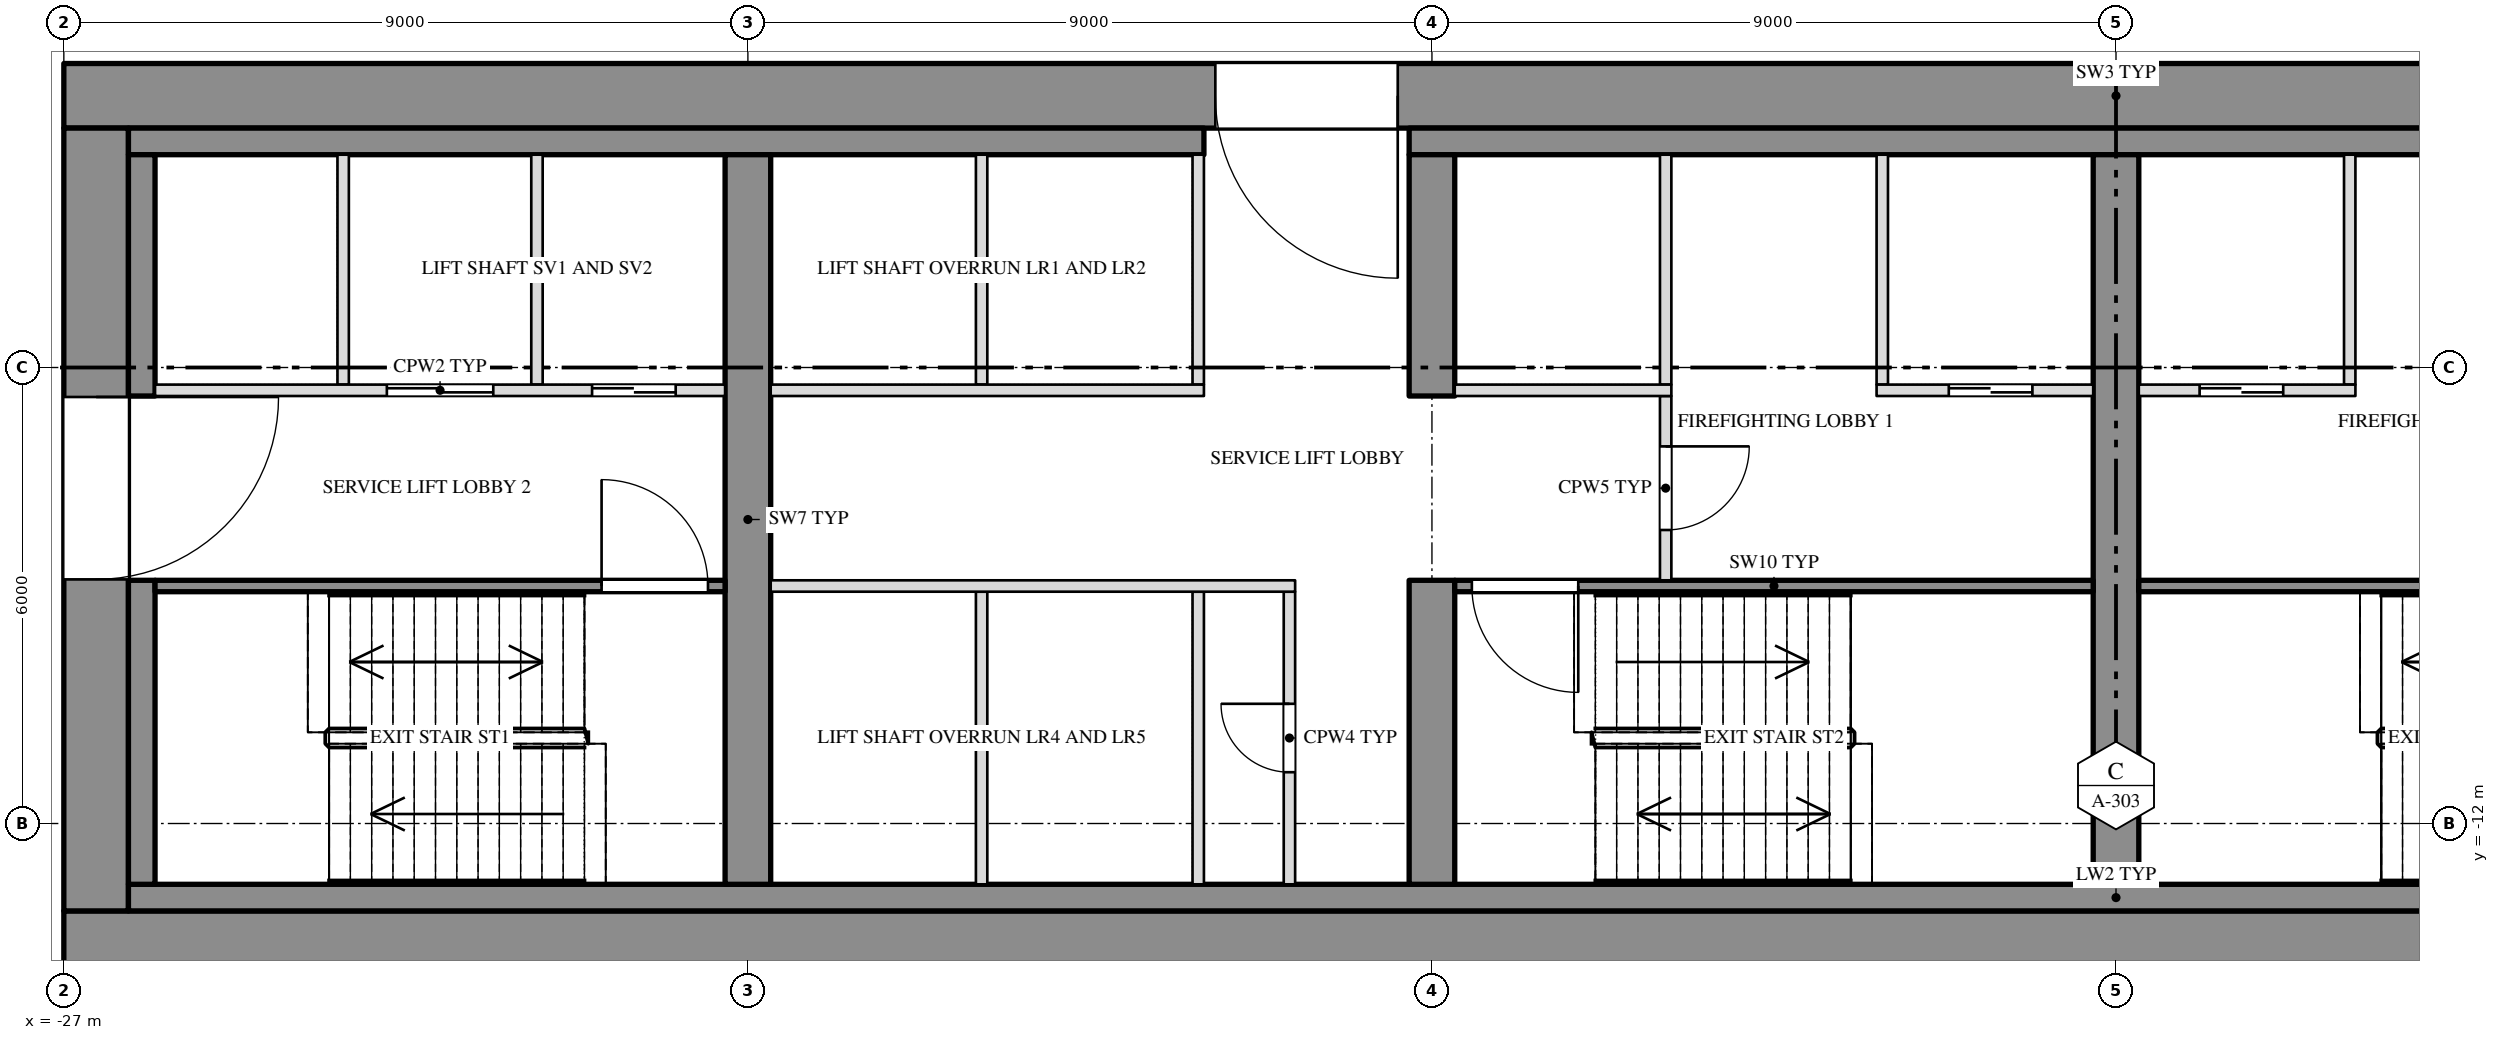
"""IFC4 building model, lengths in metres.
Left out: names, types, materials, properties, quantities, classifications, styles, units other than length and angle.
Written with IfcOpenShell. Run it as: python <this file> out.ifc"""

import sys

from ifc_helpers import new_model, si_unit, direction, frame, frame_2d, origin, place, context, subcontext, project, spatial, rectangle, extrude, element, fill, save


model = new_model("IFC4")
c1 = context("Model", 3, precision=1e-05, world=origin(), true_north=direction((0.0, 1.0)))
c2 = subcontext(c1, "Body", "Model", "MODEL_VIEW")
j1 = project(units=[si_unit("LENGTHUNIT", "METRE"), si_unit("PLANEANGLEUNIT", "RADIAN")], contexts=[c1])
p1 = place(None, origin())
s1 = spatial("IfcSite", under=j1, at=p1, CompositionType="ELEMENT")
p2 = place(p1, origin())
s2 = spatial("IfcBuilding", under=s1, at=p2, CompositionType="ELEMENT")
p3 = place(p2, frame((0.0, 0.0, 160.5)))
s3 = spatial("IfcBuildingStorey", under=s2, at=p3, CompositionType="ELEMENT", Elevation=160.5)
p4 = place(p3, frame((-27.0, -2.425, 0.0), z_axis=(0.0, 0.0, 1.0), x_axis=(1.0, 0.0, 0.0)))
e1 = element("IfcWall", 1, at=p4, inside=s3, PredefinedType="SHEAR", context=c2, shape_type="SweptSolid", body=[
    extrude(rectangle(XDim=54.0, YDim=0.85, at=frame_2d((27.0, 0.0))), origin(), (0.0, 0.0, 1.0), 3.8),
])
p5 = place(p4, frame((15.15, 0.0, 0.0)))
e2 = element("IfcOpeningElement", 2, at=p5, cuts=e1, PredefinedType="OPENING", context=c2, shape_type="SweptSolid", body=[
    extrude(rectangle(XDim=2.4, YDim=2.1, at=frame_2d((1.2, 1.05))), frame((0.0, 0.437, 0.0), z_axis=(0.0, -1.0, 0.0), x_axis=(1.0, 0.0, 0.0)), (0.0, 0.0, 1.0), 0.874),
])
p6 = place(p4, frame((36.45, 0.0, 0.0)))
e3 = element("IfcOpeningElement", 3, at=p6, cuts=e1, PredefinedType="OPENING", context=c2, shape_type="SweptSolid", body=[
    extrude(rectangle(XDim=2.4, YDim=2.1, at=frame_2d((1.2, 1.05))), frame((0.0, 0.437, 0.0), z_axis=(0.0, -1.0, 0.0), x_axis=(1.0, 0.0, 0.0)), (0.0, 0.0, 1.0), 0.874),
])
p7 = place(p3, frame((-27.0, -13.575, 0.0), z_axis=(0.0, 0.0, 1.0), x_axis=(1.0, 0.0, 0.0)))
e4 = element("IfcWall", 4, at=p7, inside=s3, PredefinedType="SHEAR", context=c2, shape_type="SweptSolid", body=[
    extrude(rectangle(XDim=54.0, YDim=0.85, at=frame_2d((27.0, 0.0))), origin(), (0.0, 0.0, 1.0), 3.8),
])
p8 = place(p3, frame((-26.575, -13.15, 0.0), z_axis=(0.0, 0.0, 1.0), x_axis=(0.0, 1.0, 0.0)))
e5 = element("IfcWall", 5, at=p8, inside=s3, PredefinedType="SHEAR", context=c2, shape_type="SweptSolid", body=[
    extrude(rectangle(XDim=10.3, YDim=0.85, at=frame_2d((5.15, 0.0))), origin(), (0.0, 0.0, 1.0), 3.8),
])
p9 = place(p8, frame((4.362, 0.0, 0.0)))
e6 = element("IfcOpeningElement", 6, at=p9, cuts=e5, PredefinedType="OPENING", context=c2, shape_type="SweptSolid", body=[
    extrude(rectangle(XDim=2.4, YDim=2.1, at=frame_2d((1.2, 1.05))), frame((0.0, 0.437, 0.0), z_axis=(0.0, -1.0, 0.0), x_axis=(1.0, 0.0, 0.0)), (0.0, 0.0, 1.0), 0.874),
])
p10 = place(p3, frame((-26.15, -3.025, 0.0), z_axis=(0.0, 0.0, 1.0), x_axis=(1.0, 0.0, 0.0)))
e7 = element("IfcWall", 7, at=p10, inside=s3, PredefinedType="SHEAR", context=c2, shape_type="SweptSolid", body=[
    extrude(rectangle(XDim=14.15, YDim=0.35, at=frame_2d((7.075, 0.0))), origin(), (0.0, 0.0, 1.0), 3.8),
])
p11 = place(p3, frame((-9.3, -3.025, 0.0), z_axis=(0.0, 0.0, 1.0), x_axis=(1.0, 0.0, 0.0)))
e8 = element("IfcWall", 8, at=p11, inside=s3, PredefinedType="SHEAR", context=c2, shape_type="SweptSolid", body=[
    extrude(rectangle(XDim=18.6, YDim=0.35, at=frame_2d((9.3, 0.0))), origin(), (0.0, 0.0, 1.0), 3.8),
])
p12 = place(p3, frame((-26.15, -12.975, 0.0), z_axis=(0.0, 0.0, 1.0), x_axis=(1.0, 0.0, 0.0)))
e9 = element("IfcWall", 9, at=p12, inside=s3, PredefinedType="SHEAR", context=c2, shape_type="SweptSolid", body=[
    extrude(rectangle(XDim=52.3, YDim=0.35, at=frame_2d((26.15, 0.0))), origin(), (0.0, 0.0, 1.0), 3.8),
])
p13 = place(p3, frame((-25.975, -12.8, 0.0), z_axis=(0.0, 0.0, 1.0), x_axis=(0.0, 1.0, 0.0)))
e10 = element("IfcWall", 10, at=p13, inside=s3, PredefinedType="SHEAR", context=c2, shape_type="SweptSolid", body=[
    extrude(rectangle(XDim=4.0, YDim=0.35, at=frame_2d((2.0, 0.0))), origin(), (0.0, 0.0, 1.0), 3.8),
])
p14 = place(p3, frame((-25.975, -6.375, 0.0), z_axis=(0.0, 0.0, 1.0), x_axis=(0.0, 1.0, 0.0)))
e11 = element("IfcWall", 11, at=p14, inside=s3, PredefinedType="SHEAR", context=c2, shape_type="SweptSolid", body=[
    extrude(rectangle(XDim=3.175, YDim=0.35, at=frame_2d((1.587, 0.0))), origin(), (0.0, 0.0, 1.0), 3.8),
])
p15 = place(p3, frame((-18.0, -12.8, 0.0), z_axis=(0.0, 0.0, 1.0), x_axis=(0.0, 1.0, 0.0)))
e12 = element("IfcWall", 12, at=p15, inside=s3, PredefinedType="SHEAR", context=c2, shape_type="SweptSolid", body=[
    extrude(rectangle(XDim=9.6, YDim=0.6, at=frame_2d((4.8, 0.0))), origin(), (0.0, 0.0, 1.0), 3.8),
])
p16 = place(p3, frame((-9.0, -12.8, 0.0), z_axis=(0.0, 0.0, 1.0), x_axis=(0.0, 1.0, 0.0)))
e13 = element("IfcWall", 13, at=p16, inside=s3, PredefinedType="SHEAR", context=c2, shape_type="SweptSolid", body=[
    extrude(rectangle(XDim=4.0, YDim=0.6, at=frame_2d((2.0, 0.0))), origin(), (0.0, 0.0, 1.0), 3.8),
])
p17 = place(p3, frame((-9.0, -6.375, 0.0), z_axis=(0.0, 0.0, 1.0), x_axis=(0.0, 1.0, 0.0)))
e14 = element("IfcWall", 14, at=p17, inside=s3, PredefinedType="SHEAR", context=c2, shape_type="SweptSolid", body=[
    extrude(rectangle(XDim=3.175, YDim=0.6, at=frame_2d((1.587, 0.0))), origin(), (0.0, 0.0, 1.0), 3.8),
])
p18 = place(p3, frame((0.0, -12.8, 0.0), z_axis=(0.0, 0.0, 1.0), x_axis=(0.0, 1.0, 0.0)))
e15 = element("IfcWall", 15, at=p18, inside=s3, PredefinedType="SHEAR", context=c2, shape_type="SweptSolid", body=[
    extrude(rectangle(XDim=9.6, YDim=0.6, at=frame_2d((4.8, 0.0))), origin(), (0.0, 0.0, 1.0), 3.8),
])
for number, where, z_axis, x_axis in (
    (16, (-20.775, -6.225, 0.0), (0.0, 0.0, 1.0), (0.0, 1.0, 0.0)),
    (17, (-23.325, -6.225, 0.0), (0.0, 0.0, 1.0), (0.0, 1.0, 0.0)),
    (18, (-12.075, -6.225, 0.0), (0.0, 0.0, 1.0), (0.0, 1.0, 0.0)),
    (19, (-14.925, -6.225, 0.0), (0.0, 0.0, 1.0), (0.0, 1.0, 0.0)),
    (20, (-3.075, -6.225, 0.0), (0.0, 0.0, 1.0), (0.0, 1.0, 0.0)),
    (21, (-5.925, -6.225, 0.0), (0.0, 0.0, 1.0), (0.0, 1.0, 0.0)),
    (22, (3.075, -6.225, 0.0), (0.0, 0.0, 1.0), (0.0, 1.0, 0.0)),
):
    element("IfcWall", number, at=place(p3, frame(where, z_axis=z_axis, x_axis=x_axis)), inside=s3, PredefinedType="PARTITIONING", context=c2, shape_type="SweptSolid", body=[
        extrude(rectangle(XDim=3.025, YDim=0.15, at=frame_2d((1.513, 0.0))), origin(), (0.0, 0.0, 1.0), 3.8),
    ])
p19 = place(p3, frame((-10.875, -12.8, 0.0), z_axis=(0.0, 0.0, 1.0), x_axis=(0.0, 1.0, 0.0)))
e23 = element("IfcWall", 23, at=p19, inside=s3, PredefinedType="PARTITIONING", context=c2, shape_type="SweptSolid", body=[
    extrude(rectangle(XDim=3.85, YDim=0.15, at=frame_2d((1.925, 0.0))), origin(), (0.0, 0.0, 1.0), 3.8),
])
p20 = place(p19, frame((1.475, 0.0, 0.0)))
e24 = element("IfcOpeningElement", 24, at=p20, cuts=e23, PredefinedType="OPENING", context=c2, shape_type="SweptSolid", body=[
    extrude(rectangle(XDim=0.9, YDim=2.1, at=frame_2d((0.45, 1.05))), frame((0.0, 0.087, 0.0), z_axis=(0.0, -1.0, 0.0), x_axis=(1.0, 0.0, 0.0)), (0.0, 0.0, 1.0), 0.174),
])
for number, where, z_axis, x_axis in (
    (25, (-12.075, -12.8, 0.0), (0.0, 0.0, 1.0), (0.0, 1.0, 0.0)),
    (26, (-14.925, -12.8, 0.0), (0.0, 0.0, 1.0), (0.0, 1.0, 0.0)),
):
    element("IfcWall", number, at=place(p3, frame(where, z_axis=z_axis, x_axis=x_axis)), inside=s3, PredefinedType="PARTITIONING", context=c2, shape_type="SweptSolid", body=[
        extrude(rectangle(XDim=3.85, YDim=0.15, at=frame_2d((1.925, 0.0))), origin(), (0.0, 0.0, 1.0), 3.8),
    ])
p21 = place(p3, frame((-5.925, -8.8, 0.0), z_axis=(0.0, 0.0, 1.0), x_axis=(0.0, 1.0, 0.0)))
e27 = element("IfcWall", 27, at=p21, inside=s3, PredefinedType="PARTITIONING", context=c2, shape_type="SweptSolid", body=[
    extrude(rectangle(XDim=2.425, YDim=0.15, at=frame_2d((1.212, 0.0))), origin(), (0.0, 0.0, 1.0), 3.8),
])
p22 = place(p21, frame((0.662, 0.0, 0.0)))
e28 = element("IfcOpeningElement", 28, at=p22, cuts=e27, PredefinedType="OPENING", context=c2, shape_type="SweptSolid", body=[
    extrude(rectangle(XDim=1.1, YDim=2.1, at=frame_2d((0.55, 1.05))), frame((0.0, 0.087, 0.0), z_axis=(0.0, -1.0, 0.0), x_axis=(1.0, 0.0, 0.0)), (0.0, 0.0, 1.0), 0.174),
])
p23 = place(p3, frame((-25.8, -6.3, 0.0), z_axis=(0.0, 0.0, 1.0), x_axis=(1.0, 0.0, 0.0)))
e29 = element("IfcWall", 29, at=p23, inside=s3, PredefinedType="PARTITIONING", context=c2, shape_type="SweptSolid", body=[
    extrude(rectangle(XDim=7.5, YDim=0.15, at=frame_2d((3.75, 0.0))), origin(), (0.0, 0.0, 1.0), 3.8),
])
p24 = place(p23, frame((3.05, 0.0, 0.0)))
e30 = element("IfcOpeningElement", 30, at=p24, cuts=e29, PredefinedType="OPENING", context=c2, shape_type="SweptSolid", body=[
    extrude(rectangle(XDim=1.4, YDim=2.1, at=frame_2d((0.7, 1.05))), frame((0.0, 0.087, 0.0), z_axis=(0.0, -1.0, 0.0), x_axis=(1.0, 0.0, 0.0)), (0.0, 0.0, 1.0), 0.174),
])
p25 = place(p23, frame((5.75, 0.0, 0.0)))
e31 = element("IfcOpeningElement", 31, at=p25, cuts=e29, PredefinedType="OPENING", context=c2, shape_type="SweptSolid", body=[
    extrude(rectangle(XDim=1.1, YDim=2.1, at=frame_2d((0.55, 1.05))), frame((0.0, 0.087, 0.0), z_axis=(0.0, -1.0, 0.0), x_axis=(1.0, 0.0, 0.0)), (0.0, 0.0, 1.0), 0.174),
])
p26 = place(p3, frame((-17.7, -6.3, 0.0), z_axis=(0.0, 0.0, 1.0), x_axis=(1.0, 0.0, 0.0)))
e32 = element("IfcWall", 32, at=p26, inside=s3, PredefinedType="PARTITIONING", context=c2, shape_type="SweptSolid", body=[
    extrude(rectangle(XDim=5.7, YDim=0.15, at=frame_2d((2.85, 0.0))), origin(), (0.0, 0.0, 1.0), 3.8),
])
p27 = place(p3, frame((-8.7, -6.3, 0.0), z_axis=(0.0, 0.0, 1.0), x_axis=(1.0, 0.0, 0.0)))
e33 = element("IfcWall", 33, at=p27, inside=s3, PredefinedType="PARTITIONING", context=c2, shape_type="SweptSolid", body=[
    extrude(rectangle(XDim=2.85, YDim=0.15, at=frame_2d((1.425, 0.0))), origin(), (0.0, 0.0, 1.0), 3.8),
])
p28 = place(p3, frame((-3.15, -6.3, 0.0), z_axis=(0.0, 0.0, 1.0), x_axis=(1.0, 0.0, 0.0)))
e34 = element("IfcWall", 34, at=p28, inside=s3, PredefinedType="PARTITIONING", context=c2, shape_type="SweptSolid", body=[
    extrude(rectangle(XDim=2.85, YDim=0.15, at=frame_2d((1.425, 0.0))), origin(), (0.0, 0.0, 1.0), 3.8),
])
p29 = place(p28, frame((0.95, 0.0, 0.0)))
e35 = element("IfcOpeningElement", 35, at=p29, cuts=e34, PredefinedType="OPENING", context=c2, shape_type="SweptSolid", body=[
    extrude(rectangle(XDim=1.1, YDim=2.1, at=frame_2d((0.55, 1.05))), frame((0.0, 0.087, 0.0), z_axis=(0.0, -1.0, 0.0), x_axis=(1.0, 0.0, 0.0)), (0.0, 0.0, 1.0), 0.174),
])
p30 = place(p3, frame((0.3, -6.3, 0.0), z_axis=(0.0, 0.0, 1.0), x_axis=(1.0, 0.0, 0.0)))
e36 = element("IfcWall", 36, at=p30, inside=s3, PredefinedType="PARTITIONING", context=c2, shape_type="SweptSolid", body=[
    extrude(rectangle(XDim=2.85, YDim=0.15, at=frame_2d((1.425, 0.0))), origin(), (0.0, 0.0, 1.0), 3.8),
])
p31 = place(p30, frame((0.8, 0.0, 0.0)))
e37 = element("IfcOpeningElement", 37, at=p31, cuts=e36, PredefinedType="OPENING", context=c2, shape_type="SweptSolid", body=[
    extrude(rectangle(XDim=1.1, YDim=2.1, at=frame_2d((0.55, 1.05))), frame((0.0, 0.087, 0.0), z_axis=(0.0, -1.0, 0.0), x_axis=(1.0, 0.0, 0.0)), (0.0, 0.0, 1.0), 0.174),
])
p32 = place(p3, frame((-25.8, -8.875, 0.0), z_axis=(0.0, 0.0, 1.0), x_axis=(1.0, 0.0, 0.0)))
e38 = element("IfcWall", 38, at=p32, inside=s3, PredefinedType="SHEAR", context=c2, shape_type="SweptSolid", body=[
    extrude(rectangle(XDim=7.5, YDim=0.15, at=frame_2d((3.75, 0.0))), origin(), (0.0, 0.0, 1.0), 3.8),
])
p33 = place(p32, frame((5.875, 0.0, 0.0)))
e39 = element("IfcOpeningElement", 39, at=p33, cuts=e38, PredefinedType="OPENING", context=c2, shape_type="SweptSolid", body=[
    extrude(rectangle(XDim=1.4, YDim=2.1, at=frame_2d((0.7, 1.05))), frame((0.0, 0.087, 0.0), z_axis=(0.0, -1.0, 0.0), x_axis=(1.0, 0.0, 0.0)), (0.0, 0.0, 1.0), 0.174),
])
p34 = place(p3, frame((-17.7, -8.875, 0.0), z_axis=(0.0, 0.0, 1.0), x_axis=(1.0, 0.0, 0.0)))
e40 = element("IfcWall", 40, at=p34, inside=s3, PredefinedType="PARTITIONING", context=c2, shape_type="SweptSolid", body=[
    extrude(rectangle(XDim=6.9, YDim=0.15, at=frame_2d((3.45, 0.0))), origin(), (0.0, 0.0, 1.0), 3.8),
])
p35 = place(p3, frame((-8.7, -8.875, 0.0), z_axis=(0.0, 0.0, 1.0), x_axis=(1.0, 0.0, 0.0)))
e41 = element("IfcWall", 41, at=p35, inside=s3, PredefinedType="SHEAR", context=c2, shape_type="SweptSolid", body=[
    extrude(rectangle(XDim=8.4, YDim=0.15, at=frame_2d((4.2, 0.0))), origin(), (0.0, 0.0, 1.0), 3.8),
])
p36 = place(p35, frame((0.225, 0.0, 0.0)))
e42 = element("IfcOpeningElement", 42, at=p36, cuts=e41, PredefinedType="OPENING", context=c2, shape_type="SweptSolid", body=[
    extrude(rectangle(XDim=1.4, YDim=2.1, at=frame_2d((0.7, 1.05))), frame((0.0, 0.087, 0.0), z_axis=(0.0, -1.0, 0.0), x_axis=(1.0, 0.0, 0.0)), (0.0, 0.0, 1.0), 0.174),
])
p37 = place(p3, frame((0.3, -8.875, 0.0), z_axis=(0.0, 0.0, 1.0), x_axis=(1.0, 0.0, 0.0)))
e43 = element("IfcWall", 43, at=p37, inside=s3, PredefinedType="SHEAR", context=c2, shape_type="SweptSolid", body=[
    extrude(rectangle(XDim=8.4, YDim=0.15, at=frame_2d((4.2, 0.0))), origin(), (0.0, 0.0, 1.0), 3.8),
])
p38 = place(p37, frame((6.775, 0.0, 0.0)))
e44 = element("IfcOpeningElement", 44, at=p38, cuts=e43, PredefinedType="OPENING", context=c2, shape_type="SweptSolid", body=[
    extrude(rectangle(XDim=1.4, YDim=2.1, at=frame_2d((0.7, 1.05))), frame((0.0, 0.087, 0.0), z_axis=(0.0, -1.0, 0.0), x_axis=(1.0, 0.0, 0.0)), (0.0, 0.0, 1.0), 0.174),
])
p39 = place(p9, origin())
e45 = element("IfcDoor", 45, at=p39, inside=s3, OperationType="DOUBLE_DOOR_SINGLE_SWING", PredefinedType="DOOR", context=c2, shape_type="SweptSolid", body=[
    extrude(rectangle(XDim=2.4, YDim=2.1, at=frame_2d((1.2, 1.05))), frame((0.0, 0.025, 0.0), z_axis=(0.0, -1.0, 0.0), x_axis=(1.0, 0.0, 0.0)), (0.0, 0.0, 1.0), 0.05),
])
fill(e6, e45)
p40 = place(p24, origin())
e46 = element("IfcDoor", 46, at=p40, inside=s3, OperationType="SLIDING_TO_RIGHT", PredefinedType="DOOR", context=c2, shape_type="SweptSolid", body=[
    extrude(rectangle(XDim=1.4, YDim=2.1, at=frame_2d((0.7, 1.05))), frame((0.0, 0.025, 0.0), z_axis=(0.0, -1.0, 0.0), x_axis=(1.0, 0.0, 0.0)), (0.0, 0.0, 1.0), 0.05),
])
fill(e30, e46)
p41 = place(p25, origin())
e47 = element("IfcDoor", 47, at=p41, inside=s3, OperationType="SLIDING_TO_LEFT", PredefinedType="DOOR", context=c2, shape_type="SweptSolid", body=[
    extrude(rectangle(XDim=1.1, YDim=2.1, at=frame_2d((0.55, 1.05))), frame((0.0, 0.025, 0.0), z_axis=(0.0, -1.0, 0.0), x_axis=(1.0, 0.0, 0.0)), (0.0, 0.0, 1.0), 0.05),
])
fill(e31, e47)
p42 = place(p33, origin())
e48 = element("IfcDoor", 48, at=p42, inside=s3, OperationType="DOUBLE_DOOR_SINGLE_SWING", PredefinedType="DOOR", context=c2, shape_type="SweptSolid", body=[
    extrude(rectangle(XDim=1.4, YDim=2.1, at=frame_2d((0.7, 1.05))), frame((0.0, 0.025, 0.0), z_axis=(0.0, -1.0, 0.0), x_axis=(1.0, 0.0, 0.0)), (0.0, 0.0, 1.0), 0.05),
])
fill(e39, e48)
p43 = place(p20, origin())
e49 = element("IfcDoor", 49, at=p43, inside=s3, OperationType="SINGLE_SWING_RIGHT", PredefinedType="DOOR", context=c2, shape_type="SweptSolid", body=[
    extrude(rectangle(XDim=0.9, YDim=2.1, at=frame_2d((0.45, 1.05))), frame((0.0, 0.025, 0.0), z_axis=(0.0, -1.0, 0.0), x_axis=(1.0, 0.0, 0.0)), (0.0, 0.0, 1.0), 0.05),
])
fill(e24, e49)
p44 = place(p5, origin())
e50 = element("IfcDoor", 50, at=p44, inside=s3, OperationType="DOUBLE_DOOR_SINGLE_SWING", PredefinedType="DOOR", context=c2, shape_type="SweptSolid", body=[
    extrude(rectangle(XDim=2.4, YDim=2.1, at=frame_2d((1.2, 1.05))), frame((0.0, 0.025, 0.0), z_axis=(0.0, -1.0, 0.0), x_axis=(1.0, 0.0, 0.0)), (0.0, 0.0, 1.0), 0.05),
])
fill(e2, e50)
p45 = place(p36, origin())
e51 = element("IfcDoor", 51, at=p45, inside=s3, OperationType="DOUBLE_DOOR_SINGLE_SWING", PredefinedType="DOOR", context=c2, shape_type="SweptSolid", body=[
    extrude(rectangle(XDim=1.4, YDim=2.1, at=frame_2d((0.7, 1.05))), frame((0.0, 0.025, 0.0), z_axis=(0.0, -1.0, 0.0), x_axis=(1.0, 0.0, 0.0)), (0.0, 0.0, 1.0), 0.05),
])
fill(e42, e51)
p46 = place(p22, origin())
e52 = element("IfcDoor", 52, at=p46, inside=s3, OperationType="SINGLE_SWING_LEFT", PredefinedType="DOOR", context=c2, shape_type="SweptSolid", body=[
    extrude(rectangle(XDim=1.1, YDim=2.1, at=frame_2d((0.55, 1.05))), frame((0.0, 0.025, 0.0), z_axis=(0.0, -1.0, 0.0), x_axis=(1.0, 0.0, 0.0)), (0.0, 0.0, 1.0), 0.05),
])
fill(e28, e52)
p47 = place(p29, origin())
e53 = element("IfcDoor", 53, at=p47, inside=s3, OperationType="SLIDING_TO_LEFT", PredefinedType="DOOR", context=c2, shape_type="SweptSolid", body=[
    extrude(rectangle(XDim=1.1, YDim=2.1, at=frame_2d((0.55, 1.05))), frame((0.0, 0.025, 0.0), z_axis=(0.0, -1.0, 0.0), x_axis=(1.0, 0.0, 0.0)), (0.0, 0.0, 1.0), 0.05),
])
fill(e35, e53)
p48 = place(p31, origin())
e54 = element("IfcDoor", 54, at=p48, inside=s3, OperationType="SLIDING_TO_RIGHT", PredefinedType="DOOR", context=c2, shape_type="SweptSolid", body=[
    extrude(rectangle(XDim=1.1, YDim=2.1, at=frame_2d((0.55, 1.05))), frame((0.0, 0.025, 0.0), z_axis=(0.0, -1.0, 0.0), x_axis=(1.0, 0.0, 0.0)), (0.0, 0.0, 1.0), 0.05),
])
fill(e37, e54)
save(model, sys.argv[1])
